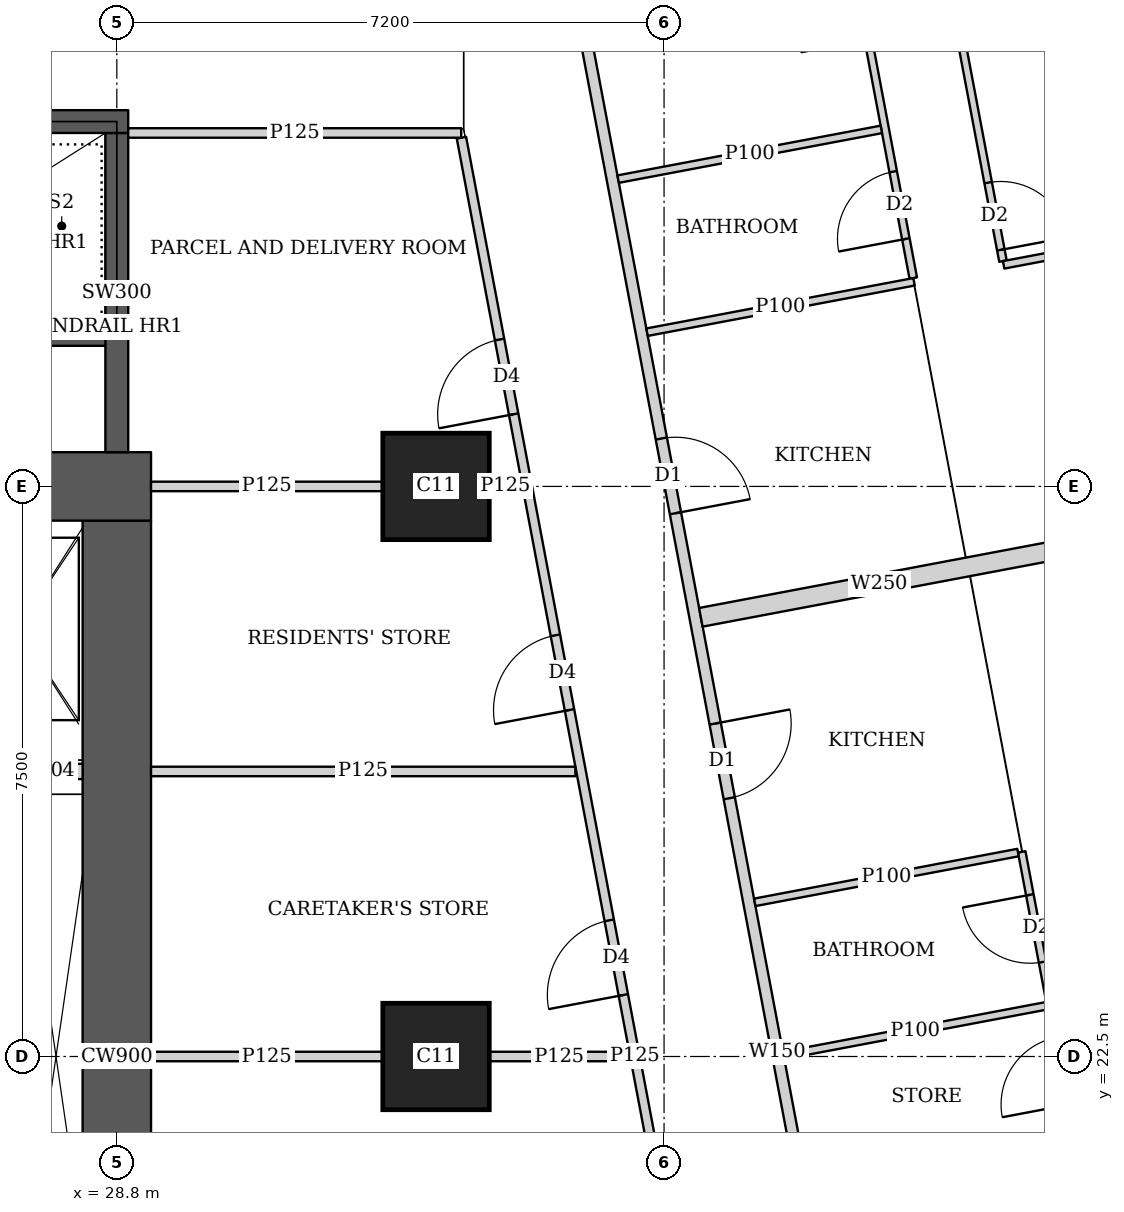
"""IFC4 building model, lengths in metres.
Left out: names, types, materials, properties, quantities, classifications, styles, units other than length and angle.
Written with IfcOpenShell. Run it as: python <this file> out.ifc"""

import sys

from ifc_helpers import new_model, si_unit, direction, frame, frame_2d, origin, origin_2d, place, context, subcontext, project, spatial, rectangle, extrude, element, fill, save


model = new_model("IFC4")
c1 = context("Model", 3, precision=1e-05, world=origin(), true_north=direction((0.0, 1.0)))
c2 = subcontext(c1, "Body", "Model", "MODEL_VIEW")
j1 = project(units=[si_unit("LENGTHUNIT", "METRE"), si_unit("PLANEANGLEUNIT", "RADIAN")], contexts=[c1])
p1 = place(None, origin())
s1 = spatial("IfcSite", under=j1, at=p1, CompositionType="ELEMENT")
p2 = place(p1, origin())
s2 = spatial("IfcBuilding", under=s1, at=p2, CompositionType="ELEMENT")
p3 = place(p2, frame((0.0, 0.0, 208.7)))
s3 = spatial("IfcBuildingStorey", under=s2, at=p3, CompositionType="ELEMENT", Elevation=208.7)
for number, where, z_axis, x_axis in (
    (1, (33.0, 22.5, 0.0), (0.0, 0.0, 1.0), (1.0, 0.0, 0.0)),
    (2, (33.0, 30.0, 0.0), (0.0, 0.0, 1.0), (1.0, 0.0, 0.0)),
):
    element("IfcColumn", number, at=place(p3, frame(where, z_axis=z_axis, x_axis=x_axis)), inside=s3, PredefinedType="COLUMN", context=c2, shape_type="SweptSolid", body=[
        extrude(rectangle(XDim=1.4, YDim=1.4, at=origin_2d()), origin(), (0.0, 0.0, 1.0), 3.75),
    ])
p4 = place(p3, frame((13.95, 30.0, 0.0), z_axis=(0.0, 0.0, 1.0), x_axis=(1.0, 0.0, 0.0)))
e3 = element("IfcWall", 3, at=p4, inside=s3, PredefinedType="SHEAR", context=c2, shape_type="SweptSolid", body=[
    extrude(rectangle(XDim=15.3, YDim=0.9, at=frame_2d((7.65, 0.0))), origin(), (0.0, 0.0, 1.0), 3.75),
])
p5 = place(p4, frame((4.45, 0.0, 0.0)))
e4 = element("IfcOpeningElement", 4, at=p5, cuts=e3, PredefinedType="OPENING", context=c2, shape_type="SweptSolid", body=[
    extrude(rectangle(XDim=1.8, YDim=2.1, at=frame_2d((0.9, 1.05))), frame((0.0, 0.46, 0.0), z_axis=(0.0, -1.0, 0.0), x_axis=(1.0, 0.0, 0.0)), (0.0, 0.0, 1.0), 0.92),
])
p6 = place(p4, frame((10.7, 0.0, 0.0)))
e5 = element("IfcOpeningElement", 5, at=p6, cuts=e3, PredefinedType="OPENING", context=c2, shape_type="SweptSolid", body=[
    extrude(rectangle(XDim=1.1, YDim=2.1, at=frame_2d((0.55, 1.05))), frame((0.0, 0.46, 0.0), z_axis=(0.0, -1.0, 0.0), x_axis=(1.0, 0.0, 0.0)), (0.0, 0.0, 1.0), 0.92),
])
p7 = place(p3, frame((28.8, 15.45, 0.0), z_axis=(0.0, 0.0, 1.0), x_axis=(0.0, 1.0, 0.0)))
e6 = element("IfcWall", 6, at=p7, inside=s3, PredefinedType="SHEAR", context=c2, shape_type="SweptSolid", body=[
    extrude(rectangle(XDim=14.1, YDim=0.9, at=frame_2d((7.05, 0.0))), origin(), (0.0, 0.0, 1.0), 3.75),
])
p8 = place(p3, frame((21.45, 34.8, 0.0), z_axis=(0.0, 0.0, 1.0), x_axis=(1.0, 0.0, 0.0)))
e7 = element("IfcWall", 7, at=p8, inside=s3, PredefinedType="SHEAR", context=c2, shape_type="SweptSolid", body=[
    extrude(rectangle(XDim=7.5, YDim=0.3, at=frame_2d((3.75, 0.0))), origin(), (0.0, 0.0, 1.0), 3.75),
])
p9 = place(p8, frame((0.5, 0.0, 0.0)))
e8 = element("IfcOpeningElement", 8, at=p9, cuts=e7, PredefinedType="OPENING", context=c2, shape_type="SweptSolid", body=[
    extrude(rectangle(XDim=1.1, YDim=2.1, at=frame_2d((0.55, 1.05))), frame((0.0, 0.16, 0.0), z_axis=(0.0, -1.0, 0.0), x_axis=(1.0, 0.0, 0.0)), (0.0, 0.0, 1.0), 0.32),
])
p10 = place(p3, frame((28.8, 30.45, 0.0), z_axis=(0.0, 0.0, 1.0), x_axis=(0.0, 1.0, 0.0)))
e9 = element("IfcWall", 9, at=p10, inside=s3, PredefinedType="SHEAR", context=c2, shape_type="SweptSolid", body=[
    extrude(rectangle(XDim=4.2, YDim=0.3, at=frame_2d((2.1, 0.0))), origin(), (0.0, 0.0, 1.0), 3.75),
])
p11 = place(p3, frame((33.68, 42.723, 0.0), z_axis=(0.0, 0.0, 1.0), x_axis=(0.185601160014, -0.982625162207, 0.0)))
e10 = element("IfcWall", 10, at=p11, inside=s3, PredefinedType="SOLIDWALL", context=c2, shape_type="SweptSolid", body=[
    extrude(rectangle(XDim=41.051, YDim=0.15, at=frame_2d((20.526, 0.0))), origin(), (0.0, 0.0, 1.0), 2.5),
])
p12 = place(p11, frame((12.307, 0.0, 0.0)))
e11 = element("IfcOpeningElement", 11, at=p12, cuts=e10, PredefinedType="OPENING", context=c2, shape_type="SweptSolid", body=[
    extrude(rectangle(XDim=1.0, YDim=2.1, at=frame_2d((0.5, 1.05))), frame((0.0, 0.085, 0.0), z_axis=(0.0, -1.0, 0.0), x_axis=(1.0, 0.0, 0.0)), (0.0, 0.0, 1.0), 0.17),
])
p13 = place(p11, frame((16.123, 0.0, 0.0)))
e12 = element("IfcOpeningElement", 12, at=p13, cuts=e10, PredefinedType="OPENING", context=c2, shape_type="SweptSolid", body=[
    extrude(rectangle(XDim=1.0, YDim=2.1, at=frame_2d((0.5, 1.05))), frame((0.0, 0.085, 0.0), z_axis=(0.0, -1.0, 0.0), x_axis=(1.0, 0.0, 0.0)), (0.0, 0.0, 1.0), 0.17),
])
p14 = place(p11, frame((30.902, 0.0, 0.0)))
e13 = element("IfcOpeningElement", 13, at=p14, cuts=e10, PredefinedType="OPENING", context=c2, shape_type="SweptSolid", body=[
    extrude(rectangle(XDim=1.0, YDim=2.1, at=frame_2d((0.5, 1.05))), frame((0.0, 0.085, 0.0), z_axis=(0.0, -1.0, 0.0), x_axis=(1.0, 0.0, 0.0)), (0.0, 0.0, 1.0), 0.17),
])
p15 = place(p3, frame((38.764, 41.941, 0.0), z_axis=(0.0, 0.0, 1.0), x_axis=(0.185548572312, -0.982635093671, 0.0)))
e14 = element("IfcWall", 14, at=p15, inside=s3, PredefinedType="PARTITIONING", context=c2, shape_type="SweptSolid", body=[
    extrude(rectangle(XDim=9.135, YDim=0.1, at=frame_2d((4.568, 0.0))), origin(), (0.0, 0.0, 1.0), 3.5),
])
p16 = place(p15, frame((8.085, 0.0, 0.0)))
e15 = element("IfcOpeningElement", 15, at=p16, cuts=e14, PredefinedType="OPENING", context=c2, shape_type="SweptSolid", body=[
    extrude(rectangle(XDim=0.9, YDim=2.1, at=frame_2d((0.45, 1.05))), frame((0.0, 0.06, 0.0), z_axis=(0.0, -1.0, 0.0), x_axis=(1.0, 0.0, 0.0)), (0.0, 0.0, 1.0), 0.12),
])
p17 = place(p15, frame((3.7, 0.0, 0.0)))
e16 = element("IfcOpeningElement", 16, at=p17, cuts=e14, PredefinedType="OPENING", context=c2, shape_type="SweptSolid", body=[
    extrude(rectangle(XDim=0.9, YDim=2.1, at=frame_2d((0.45, 1.05))), frame((0.0, 0.06, 0.0), z_axis=(0.0, -1.0, 0.0), x_axis=(1.0, 0.0, 0.0)), (0.0, 0.0, 1.0), 0.12),
])
p18 = place(p3, frame((37.473, 42.309, 0.0), z_axis=(0.0, 0.0, 1.0), x_axis=(0.185491912953, -0.982645790827, 0.0)))
e17 = element("IfcWall", 17, at=p18, inside=s3, PredefinedType="PARTITIONING", context=c2, shape_type="SweptSolid", body=[
    extrude(rectangle(XDim=9.737, YDim=0.1, at=frame_2d((4.869, 0.0))), origin(), (0.0, 0.0, 1.0), 3.5),
])
p19 = place(p18, frame((8.312, 0.0, 0.0)))
e18 = element("IfcOpeningElement", 18, at=p19, cuts=e17, PredefinedType="OPENING", context=c2, shape_type="SweptSolid", body=[
    extrude(rectangle(XDim=0.9, YDim=2.1, at=frame_2d((0.45, 1.05))), frame((0.0, 0.06, 0.0), z_axis=(0.0, -1.0, 0.0), x_axis=(1.0, 0.0, 0.0)), (0.0, 0.0, 1.0), 0.12),
])
p20 = place(p18, frame((2.853, 0.0, 0.0)))
e19 = element("IfcOpeningElement", 19, at=p20, cuts=e17, PredefinedType="OPENING", context=c2, shape_type="SweptSolid", body=[
    extrude(rectangle(XDim=0.9, YDim=2.1, at=frame_2d((0.45, 1.05))), frame((0.0, 0.06, 0.0), z_axis=(0.0, -1.0, 0.0), x_axis=(1.0, 0.0, 0.0)), (0.0, 0.0, 1.0), 0.12),
])
p21 = place(p18, frame((5.644, 0.0, 0.0)))
e20 = element("IfcOpeningElement", 20, at=p21, cuts=e17, PredefinedType="OPENING", context=c2, shape_type="SweptSolid", body=[
    extrude(rectangle(XDim=0.9, YDim=2.1, at=frame_2d((0.45, 1.05))), frame((0.0, 0.06, 0.0), z_axis=(0.0, -1.0, 0.0), x_axis=(1.0, 0.0, 0.0)), (0.0, 0.0, 1.0), 0.12),
])
p22 = place(p3, frame((44.693, 33.713, 0.0), z_axis=(0.0, 0.0, 1.0), x_axis=(-0.982633535512, -0.185556823879, 0.0)))
e21 = element("IfcWall", 21, at=p22, inside=s3, PredefinedType="PARTITIONING", context=c2, shape_type="SweptSolid", body=[
    extrude(rectangle(XDim=4.3, YDim=0.1, at=frame_2d((2.15, 0.0))), origin(), (0.0, 0.0, 1.0), 2.05),
])
p23 = place(p3, frame((39.289, 32.692, 0.0), z_axis=(0.0, 0.0, 1.0), x_axis=(-0.982662827464, -0.185401638399, 0.0)))
e22 = element("IfcWall", 22, at=p23, inside=s3, PredefinedType="PARTITIONING", context=c2, shape_type="SweptSolid", body=[
    extrude(rectangle(XDim=3.575, YDim=0.1, at=frame_2d((1.788, 0.0))), origin(), (0.0, 0.0, 1.0), 3.5),
])
p24 = place(p3, frame((38.859, 34.697, 0.0), z_axis=(0.0, 0.0, 1.0), x_axis=(-0.982626628545, -0.185593396635, 0.0)))
e23 = element("IfcWall", 23, at=p24, inside=s3, PredefinedType="PARTITIONING", context=c2, shape_type="SweptSolid", body=[
    extrude(rectangle(XDim=3.524, YDim=0.1, at=frame_2d((1.762, 0.0))), origin(), (0.0, 0.0, 1.0), 3.5),
])
p25 = place(p3, frame((40.706, 25.192, 0.0), z_axis=(0.0, 0.0, 1.0), x_axis=(0.185629824463, -0.982619747547, 0.0)))
e24 = element("IfcWall", 24, at=p25, inside=s3, PredefinedType="PARTITIONING", context=c2, shape_type="SweptSolid", body=[
    extrude(rectangle(XDim=9.659, YDim=0.1, at=frame_2d((4.83, 0.0))), origin(), (0.0, 0.0, 1.0), 2.5),
])
p26 = place(p25, frame((0.575, 0.0, 0.0)))
e25 = element("IfcOpeningElement", 25, at=p26, cuts=e24, PredefinedType="OPENING", context=c2, shape_type="SweptSolid", body=[
    extrude(rectangle(XDim=0.9, YDim=2.1, at=frame_2d((0.45, 1.05))), frame((0.0, 0.06, 0.0), z_axis=(0.0, -1.0, 0.0), x_axis=(1.0, 0.0, 0.0)), (0.0, 0.0, 1.0), 0.12),
])
p27 = place(p25, frame((4.166, 0.0, 0.0)))
e26 = element("IfcOpeningElement", 26, at=p27, cuts=e24, PredefinedType="OPENING", context=c2, shape_type="SweptSolid", body=[
    extrude(rectangle(XDim=0.9, YDim=2.1, at=frame_2d((0.45, 1.05))), frame((0.0, 0.06, 0.0), z_axis=(0.0, -1.0, 0.0), x_axis=(1.0, 0.0, 0.0)), (0.0, 0.0, 1.0), 0.12),
])
p28 = place(p25, frame((2.483, 0.0, 0.0)))
e27 = element("IfcOpeningElement", 27, at=p28, cuts=e24, PredefinedType="OPENING", context=c2, shape_type="SweptSolid", body=[
    extrude(rectangle(XDim=0.9, YDim=2.1, at=frame_2d((0.45, 1.05))), frame((0.0, 0.06, 0.0), z_axis=(0.0, -1.0, 0.0), x_axis=(1.0, 0.0, 0.0)), (0.0, 0.0, 1.0), 0.12),
])
p29 = place(p25, frame((6.074, 0.0, 0.0)))
e28 = element("IfcOpeningElement", 28, at=p29, cuts=e24, PredefinedType="OPENING", context=c2, shape_type="SweptSolid", body=[
    extrude(rectangle(XDim=0.9, YDim=2.1, at=frame_2d((0.45, 1.05))), frame((0.0, 0.06, 0.0), z_axis=(0.0, -1.0, 0.0), x_axis=(1.0, 0.0, 0.0)), (0.0, 0.0, 1.0), 0.12),
])
p30 = place(p3, frame((40.657, 25.183, 0.0), z_axis=(0.0, 0.0, 1.0), x_axis=(-0.982585626838, -0.185810349366, 0.0)))
e29 = element("IfcWall", 29, at=p30, inside=s3, PredefinedType="PARTITIONING", context=c2, shape_type="SweptSolid", body=[
    extrude(rectangle(XDim=3.525, YDim=0.1, at=frame_2d((1.763, 0.0))), origin(), (0.0, 0.0, 1.0), 3.5),
])
p31 = place(p3, frame((41.037, 23.168, 0.0), z_axis=(0.0, 0.0, 1.0), x_axis=(-0.982638553676, -0.185530247748, 0.0)))
e30 = element("IfcWall", 30, at=p31, inside=s3, PredefinedType="PARTITIONING", context=c2, shape_type="SweptSolid", body=[
    extrude(rectangle(XDim=3.525, YDim=0.1, at=frame_2d((1.763, 0.0))), origin(), (0.0, 0.0, 1.0), 2.5),
])
p32 = place(p3, frame((41.177, 29.164, 0.0), z_axis=(0.0, 0.0, 1.0), x_axis=(-0.982642846239, -0.185507511263, 0.0)))
e31 = element("IfcWall", 31, at=p32, inside=s3, PredefinedType="SOLIDWALL", context=c2, shape_type="SweptSolid", body=[
    extrude(rectangle(XDim=4.776, YDim=0.25, at=frame_2d((2.388, 0.0))), origin(), (0.0, 0.0, 1.0), 2.5),
])
p33 = place(p3, frame((28.95, 34.65, 0.0), z_axis=(0.0, 0.0, 1.0), x_axis=(1.0, 0.0, 0.0)))
e32 = element("IfcWall", 32, at=p33, inside=s3, PredefinedType="PARTITIONING", context=c2, shape_type="SweptSolid", body=[
    extrude(rectangle(XDim=4.381, YDim=0.125, at=frame_2d((2.19, 0.0))), origin(), (0.0, 0.0, 1.0), 3.5),
])
p34 = place(p3, frame((37.9, 10.413, 0.0), z_axis=(0.0, 0.0, 1.0), x_axis=(-0.185589740669, 0.982627319058, 0.0)))
e33 = element("IfcWall", 33, at=p34, inside=s3, PredefinedType="PARTITIONING", context=c2, shape_type="SweptSolid", body=[
    extrude(rectangle(XDim=24.602, YDim=0.125, at=frame_2d((12.301, 0.0))), origin(), (0.0, 0.0, 1.0), 2.5),
])
p35 = place(p34, frame((0.708, 0.0, 0.0)))
e34 = element("IfcOpeningElement", 34, at=p35, cuts=e33, PredefinedType="OPENING", context=c2, shape_type="SweptSolid", body=[
    extrude(rectangle(XDim=1.0, YDim=2.1, at=frame_2d((0.5, 1.05))), frame((0.0, 0.073, 0.0), z_axis=(0.0, -1.0, 0.0), x_axis=(1.0, 0.0, 0.0)), (0.0, 0.0, 1.0), 0.145),
])
p36 = place(p34, frame((5.65, 0.0, 0.0)))
e35 = element("IfcOpeningElement", 35, at=p36, cuts=e33, PredefinedType="OPENING", context=c2, shape_type="SweptSolid", body=[
    extrude(rectangle(XDim=1.0, YDim=2.1, at=frame_2d((0.5, 1.05))), frame((0.0, 0.073, 0.0), z_axis=(0.0, -1.0, 0.0), x_axis=(1.0, 0.0, 0.0)), (0.0, 0.0, 1.0), 0.145),
])
p37 = place(p34, frame((13.124, 0.0, 0.0)))
e36 = element("IfcOpeningElement", 36, at=p37, cuts=e33, PredefinedType="OPENING", context=c2, shape_type="SweptSolid", body=[
    extrude(rectangle(XDim=1.0, YDim=2.1, at=frame_2d((0.5, 1.05))), frame((0.0, 0.073, 0.0), z_axis=(0.0, -1.0, 0.0), x_axis=(1.0, 0.0, 0.0)), (0.0, 0.0, 1.0), 0.145),
])
p38 = place(p34, frame((16.94, 0.0, 0.0)))
e37 = element("IfcOpeningElement", 37, at=p38, cuts=e33, PredefinedType="OPENING", context=c2, shape_type="SweptSolid", body=[
    extrude(rectangle(XDim=1.0, YDim=2.1, at=frame_2d((0.5, 1.05))), frame((0.0, 0.073, 0.0), z_axis=(0.0, -1.0, 0.0), x_axis=(1.0, 0.0, 0.0)), (0.0, 0.0, 1.0), 0.145),
])
p39 = place(p34, frame((20.9, 0.0, 0.0)))
e38 = element("IfcOpeningElement", 38, at=p39, cuts=e33, PredefinedType="OPENING", context=c2, shape_type="SweptSolid", body=[
    extrude(rectangle(XDim=1.0, YDim=2.1, at=frame_2d((0.5, 1.05))), frame((0.0, 0.073, 0.0), z_axis=(0.0, -1.0, 0.0), x_axis=(1.0, 0.0, 0.0)), (0.0, 0.0, 1.0), 0.145),
])
p40 = place(p3, frame((29.25, 22.5, 0.0), z_axis=(0.0, 0.0, 1.0), x_axis=(1.0, 0.0, 0.0)))
e39 = element("IfcWall", 39, at=p40, inside=s3, PredefinedType="PARTITIONING", context=c2, shape_type="SweptSolid", body=[
    extrude(rectangle(XDim=3.049, YDim=0.125, at=frame_2d((1.524, 0.0))), origin(), (0.0, 0.0, 1.0), 3.5),
])
p41 = place(p3, frame((33.701, 22.5, 0.0), z_axis=(0.0, 0.0, 1.0), x_axis=(1.0, 0.0, 0.0)))
e40 = element("IfcWall", 40, at=p41, inside=s3, PredefinedType="PARTITIONING", context=c2, shape_type="SweptSolid", body=[
    extrude(rectangle(XDim=1.841, YDim=0.125, at=frame_2d((0.92, 0.0))), origin(), (0.0, 0.0, 1.0), 2.5),
])
p42 = place(p3, frame((29.25, 26.25, 0.0), z_axis=(0.0, 0.0, 1.0), x_axis=(1.0, 0.0, 0.0)))
e41 = element("IfcWall", 41, at=p42, inside=s3, PredefinedType="PARTITIONING", context=c2, shape_type="SweptSolid", body=[
    extrude(rectangle(XDim=5.583, YDim=0.125, at=frame_2d((2.792, 0.0))), origin(), (0.0, 0.0, 1.0), 3.5),
])
p43 = place(p3, frame((29.25, 30.0, 0.0), z_axis=(0.0, 0.0, 1.0), x_axis=(1.0, 0.0, 0.0)))
e42 = element("IfcWall", 42, at=p43, inside=s3, PredefinedType="PARTITIONING", context=c2, shape_type="SweptSolid", body=[
    extrude(rectangle(XDim=3.049, YDim=0.125, at=frame_2d((1.524, 0.0))), origin(), (0.0, 0.0, 1.0), 3.5),
])
p44 = place(p3, frame((33.701, 30.0, 0.0), z_axis=(0.0, 0.0, 1.0), x_axis=(1.0, 0.0, 0.0)))
e43 = element("IfcWall", 43, at=p44, inside=s3, PredefinedType="PARTITIONING", context=c2, shape_type="SweptSolid", body=[
    extrude(rectangle(XDim=0.424, YDim=0.125, at=frame_2d((0.212, 0.0))), origin(), (0.0, 0.0, 1.0), 2.5),
])
p45 = place(p3, frame((23.0, 31.95, 0.0), z_axis=(0.0, 0.0, 1.0), x_axis=(1.0, 0.0, 0.0)))
e44 = element("IfcWall", 44, at=p45, inside=s3, PredefinedType="SHEAR", context=c2, shape_type="SweptSolid", body=[
    extrude(rectangle(XDim=5.8, YDim=0.2, at=frame_2d((2.9, 0.0))), origin(), (0.0, 0.0, 1.0), 3.75),
])
p46 = place(p3, frame((27.4, 26.25, 0.0), z_axis=(0.0, 0.0, 1.0), x_axis=(1.0, 0.0, 0.0)))
e45 = element("IfcWall", 45, at=p46, inside=s3, PredefinedType="SOLIDWALL", context=c2, shape_type="SweptSolid", body=[
    extrude(rectangle(XDim=0.95, YDim=0.2, at=frame_2d((0.475, 0.0))), origin(), (0.0, 0.0, 1.0), 3.5),
])
p47 = place(p16, origin())
e46 = element("IfcDoor", 46, at=p47, inside=s3, OperationType="SINGLE_SWING_RIGHT", PredefinedType="DOOR", context=c2, shape_type="SweptSolid", body=[
    extrude(rectangle(XDim=0.9, YDim=2.1, at=frame_2d((0.45, 1.05))), frame((0.0, 0.025, 0.0), z_axis=(0.0, -1.0, 0.0), x_axis=(1.0, 0.0, 0.0)), (0.0, 0.0, 1.0), 0.05),
])
fill(e15, e46)
p48 = place(p19, origin())
e47 = element("IfcDoor", 47, at=p48, inside=s3, OperationType="SINGLE_SWING_LEFT", PredefinedType="DOOR", context=c2, shape_type="SweptSolid", body=[
    extrude(rectangle(XDim=0.9, YDim=2.1, at=frame_2d((0.45, 1.05))), frame((0.0, 0.025, 0.0), z_axis=(0.0, -1.0, 0.0), x_axis=(1.0, 0.0, 0.0)), (0.0, 0.0, 1.0), 0.05),
])
fill(e18, e47)
p49 = place(p12, origin())
e48 = element("IfcDoor", 48, at=p49, inside=s3, OperationType="SINGLE_SWING_RIGHT", PredefinedType="DOOR", context=c2, shape_type="SweptSolid", body=[
    extrude(rectangle(XDim=1.0, YDim=2.1, at=frame_2d((0.5, 1.05))), frame((0.0, 0.025, 0.0), z_axis=(0.0, -1.0, 0.0), x_axis=(1.0, 0.0, 0.0)), (0.0, 0.0, 1.0), 0.05),
])
fill(e11, e48)
p50 = place(p26, origin())
e49 = element("IfcDoor", 49, at=p50, inside=s3, OperationType="SINGLE_SWING_RIGHT", PredefinedType="DOOR", context=c2, shape_type="SweptSolid", body=[
    extrude(rectangle(XDim=0.9, YDim=2.1, at=frame_2d((0.45, 1.05))), frame((0.0, 0.025, 0.0), z_axis=(0.0, -1.0, 0.0), x_axis=(1.0, 0.0, 0.0)), (0.0, 0.0, 1.0), 0.05),
])
fill(e25, e49)
p51 = place(p13, origin())
e50 = element("IfcDoor", 50, at=p51, inside=s3, OperationType="SINGLE_SWING_LEFT", PredefinedType="DOOR", context=c2, shape_type="SweptSolid", body=[
    extrude(rectangle(XDim=1.0, YDim=2.1, at=frame_2d((0.5, 1.05))), frame((0.0, 0.025, 0.0), z_axis=(0.0, -1.0, 0.0), x_axis=(1.0, 0.0, 0.0)), (0.0, 0.0, 1.0), 0.05),
])
fill(e12, e50)
p52 = place(p37, origin())
e51 = element("IfcDoor", 51, at=p52, inside=s3, OperationType="SINGLE_SWING_LEFT", PredefinedType="DOOR", context=c2, shape_type="SweptSolid", body=[
    extrude(rectangle(XDim=1.0, YDim=2.1, at=frame_2d((0.5, 1.05))), frame((0.0, 0.025, 0.0), z_axis=(0.0, -1.0, 0.0), x_axis=(1.0, 0.0, 0.0)), (0.0, 0.0, 1.0), 0.05),
])
fill(e36, e51)
p53 = place(p38, origin())
e52 = element("IfcDoor", 52, at=p53, inside=s3, OperationType="SINGLE_SWING_LEFT", PredefinedType="DOOR", context=c2, shape_type="SweptSolid", body=[
    extrude(rectangle(XDim=1.0, YDim=2.1, at=frame_2d((0.5, 1.05))), frame((0.0, 0.025, 0.0), z_axis=(0.0, -1.0, 0.0), x_axis=(1.0, 0.0, 0.0)), (0.0, 0.0, 1.0), 0.05),
])
fill(e37, e52)
p54 = place(p39, origin())
e53 = element("IfcDoor", 53, at=p54, inside=s3, OperationType="SINGLE_SWING_LEFT", PredefinedType="DOOR", context=c2, shape_type="SweptSolid", body=[
    extrude(rectangle(XDim=1.0, YDim=2.1, at=frame_2d((0.5, 1.05))), frame((0.0, 0.025, 0.0), z_axis=(0.0, -1.0, 0.0), x_axis=(1.0, 0.0, 0.0)), (0.0, 0.0, 1.0), 0.05),
])
fill(e38, e53)
save(model, sys.argv[1])
